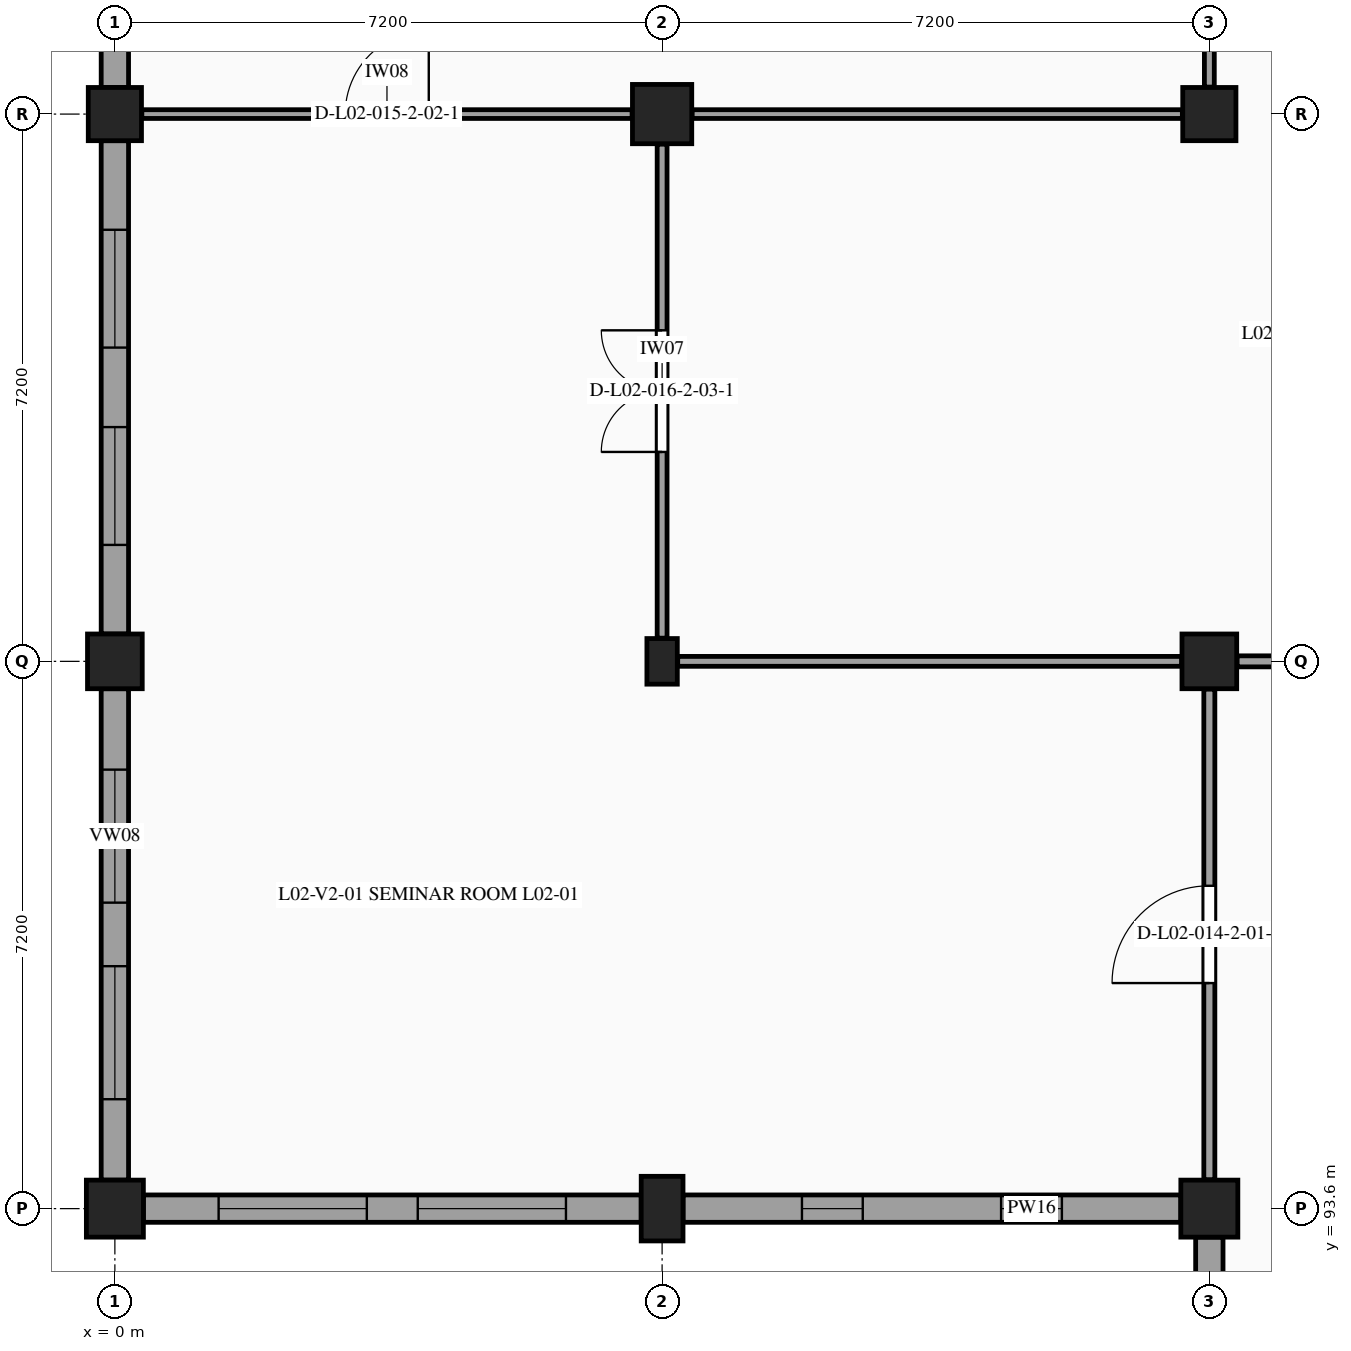
"""IFC4 building model, lengths in metres.
Left out: names, types, materials, properties, quantities, classifications, styles, units other than length and angle.
Written with IfcOpenShell. Run it as: python <this file> out.ifc"""

import sys

from ifc_helpers import new_model, si_unit, direction, frame, frame_2d, origin, origin_2d, place, context, subcontext, project, spatial, rectangle, extrude, element, fill, save


model = new_model("IFC4")
c1 = context("Model", 3, precision=1e-05, world=origin(), true_north=direction((0.0, 1.0)))
c2 = subcontext(c1, "Body", "Model", "MODEL_VIEW")
j1 = project(units=[si_unit("LENGTHUNIT", "METRE"), si_unit("PLANEANGLEUNIT", "RADIAN")], contexts=[c1])
p1 = place(None, origin())
s1 = spatial("IfcSite", under=j1, at=p1, CompositionType="ELEMENT")
p2 = place(p1, origin())
s2 = spatial("IfcBuilding", under=s1, at=p2, CompositionType="ELEMENT")
p3 = place(p2, frame((0.0, 0.0, 9.9)))
s3 = spatial("IfcBuildingStorey", under=s2, at=p3, CompositionType="ELEMENT", Elevation=9.9)
p4 = place(p3, frame((0.0, 93.6, 0.0), z_axis=(0.0, 0.0, 1.0), x_axis=(1.0, 0.0, 0.0)))
e1 = element("IfcColumn", 1, at=p4, inside=s3, PredefinedType="COLUMN", context=c2, shape_type="SweptSolid", body=[
    extrude(rectangle(XDim=0.75, YDim=0.75, at=origin_2d()), origin(), (0.0, 0.0, 1.0), 4.5),
])
p5 = place(p3, frame((0.0, 100.8, 0.0), z_axis=(0.0, 0.0, 1.0), x_axis=(1.0, 0.0, 0.0)))
e2 = element("IfcColumn", 2, at=p5, inside=s3, PredefinedType="COLUMN", context=c2, shape_type="SweptSolid", body=[
    extrude(rectangle(XDim=0.72, YDim=0.72, at=origin_2d()), origin(), (0.0, 0.0, 1.0), 4.5),
])
p6 = place(p3, frame((0.0, 108.0, 0.0), z_axis=(0.0, 0.0, 1.0), x_axis=(1.0, 0.0, 0.0)))
e3 = element("IfcColumn", 3, at=p6, inside=s3, PredefinedType="COLUMN", context=c2, shape_type="SweptSolid", body=[
    extrude(rectangle(XDim=0.7, YDim=0.7, at=origin_2d()), origin(), (0.0, 0.0, 1.0), 4.5),
])
p7 = place(p3, frame((7.2, 93.6, 0.0), z_axis=(0.0, 0.0, 1.0), x_axis=(1.0, 0.0, 0.0)))
e4 = element("IfcColumn", 4, at=p7, inside=s3, PredefinedType="COLUMN", context=c2, shape_type="SweptSolid", body=[
    extrude(rectangle(XDim=0.55, YDim=0.85, at=origin_2d()), origin(), (0.0, 0.0, 1.0), 4.5),
])
p8 = place(p3, frame((7.2, 100.8, 0.0), z_axis=(0.0, 0.0, 1.0), x_axis=(1.0, 0.0, 0.0)))
e5 = element("IfcColumn", 5, at=p8, inside=s3, PredefinedType="PILASTER", context=c2, shape_type="SweptSolid", body=[
    extrude(rectangle(XDim=0.4, YDim=0.6, at=origin_2d()), origin(), (0.0, 0.0, 1.0), 4.5),
])
p9 = place(p3, frame((7.2, 108.0, 0.0), z_axis=(0.0, 0.0, 1.0), x_axis=(1.0, 0.0, 0.0)))
e6 = element("IfcColumn", 6, at=p9, inside=s3, PredefinedType="COLUMN", context=c2, shape_type="SweptSolid", body=[
    extrude(rectangle(XDim=0.78, YDim=0.78, at=origin_2d()), origin(), (0.0, 0.0, 1.0), 4.5),
])
p10 = place(p3, frame((14.4, 93.6, 0.0), z_axis=(0.0, 0.0, 1.0), x_axis=(1.0, 0.0, 0.0)))
e7 = element("IfcColumn", 7, at=p10, inside=s3, PredefinedType="COLUMN", context=c2, shape_type="SweptSolid", body=[
    extrude(rectangle(XDim=0.75, YDim=0.75, at=origin_2d()), origin(), (0.0, 0.0, 1.0), 4.5),
])
p11 = place(p3, frame((14.4, 100.8, 0.0), z_axis=(0.0, 0.0, 1.0), x_axis=(1.0, 0.0, 0.0)))
e8 = element("IfcColumn", 8, at=p11, inside=s3, PredefinedType="COLUMN", context=c2, shape_type="SweptSolid", body=[
    extrude(rectangle(XDim=0.72, YDim=0.72, at=origin_2d()), origin(), (0.0, 0.0, 1.0), 4.5),
])
p12 = place(p3, frame((14.4, 108.0, 0.0), z_axis=(0.0, 0.0, 1.0), x_axis=(1.0, 0.0, 0.0)))
e9 = element("IfcColumn", 9, at=p12, inside=s3, PredefinedType="COLUMN", context=c2, shape_type="SweptSolid", body=[
    extrude(rectangle(XDim=0.7, YDim=0.7, at=origin_2d()), origin(), (0.0, 0.0, 1.0), 4.5),
])
p13 = place(p3, frame((14.4, 86.79, 0.0), z_axis=(0.0, 0.0, 1.0), x_axis=(0.0, 1.0, 0.0)))
e10 = element("IfcWall", 10, at=p13, inside=s3, PredefinedType="STANDARD", context=c2, shape_type="SweptSolid", body=[
    extrude(rectangle(XDim=6.435, YDim=0.36, at=frame_2d((3.218, 0.0))), origin(), (0.0, 0.0, 1.0), 3.47),
])
p14 = place(p13, frame((1.256, 0.0, 1.15)))
e11 = element("IfcOpeningElement", 11, at=p14, cuts=e10, PredefinedType="OPENING", context=c2, shape_type="SweptSolid", body=[
    extrude(rectangle(XDim=1.35, YDim=1.1, at=frame_2d((0.675, 0.55))), frame((0.0, 0.19, 0.0), z_axis=(0.0, -1.0, 0.0), x_axis=(1.0, 0.0, 0.0)), (0.0, 0.0, 1.0), 0.38),
])
p15 = place(p13, frame((3.83, 0.0, 1.15)))
e12 = element("IfcOpeningElement", 12, at=p15, cuts=e10, PredefinedType="OPENING", context=c2, shape_type="SweptSolid", body=[
    extrude(rectangle(XDim=1.35, YDim=1.1, at=frame_2d((0.675, 0.55))), frame((0.0, 0.19, 0.0), z_axis=(0.0, -1.0, 0.0), x_axis=(1.0, 0.0, 0.0)), (0.0, 0.0, 1.0), 0.38),
])
p16 = place(p3, frame((14.025, 93.6, 0.0), z_axis=(0.0, 0.0, 1.0), x_axis=(-1.0, 0.0, 0.0)))
e13 = element("IfcWall", 13, at=p16, inside=s3, PredefinedType="STANDARD", context=c2, shape_type="SweptSolid", body=[
    extrude(rectangle(XDim=6.55, YDim=0.36, at=frame_2d((3.275, 0.0))), origin(), (0.0, 0.0, 1.0), 3.47),
])
p17 = place(p16, frame((1.565, 0.0, 1.15)))
e14 = element("IfcOpeningElement", 14, at=p17, cuts=e13, PredefinedType="OPENING", context=c2, shape_type="SweptSolid", body=[
    extrude(rectangle(XDim=0.8, YDim=1.5, at=frame_2d((0.4, 0.75))), frame((0.0, 0.19, 0.0), z_axis=(0.0, -1.0, 0.0), x_axis=(1.0, 0.0, 0.0)), (0.0, 0.0, 1.0), 0.38),
])
p18 = place(p16, frame((4.185, 0.0, 1.15)))
e15 = element("IfcOpeningElement", 15, at=p18, cuts=e13, PredefinedType="OPENING", context=c2, shape_type="SweptSolid", body=[
    extrude(rectangle(XDim=0.8, YDim=1.5, at=frame_2d((0.4, 0.75))), frame((0.0, 0.19, 0.0), z_axis=(0.0, -1.0, 0.0), x_axis=(1.0, 0.0, 0.0)), (0.0, 0.0, 1.0), 0.38),
])
p19 = place(p3, frame((6.925, 93.6, 0.0), z_axis=(0.0, 0.0, 1.0), x_axis=(-1.0, 0.0, 0.0)))
e16 = element("IfcWall", 16, at=p19, inside=s3, PredefinedType="STANDARD", context=c2, shape_type="SweptSolid", body=[
    extrude(rectangle(XDim=6.55, YDim=0.36, at=frame_2d((3.275, 0.0))), origin(), (0.0, 0.0, 1.0), 3.47),
])
p20 = place(p19, frame((0.99, 0.0, 1.15)))
e17 = element("IfcOpeningElement", 17, at=p20, cuts=e16, PredefinedType="OPENING", context=c2, shape_type="SweptSolid", body=[
    extrude(rectangle(XDim=1.95, YDim=1.4, at=frame_2d((0.975, 0.7))), frame((0.0, 0.19, 0.0), z_axis=(0.0, -1.0, 0.0), x_axis=(1.0, 0.0, 0.0)), (0.0, 0.0, 1.0), 0.38),
])
p21 = place(p19, frame((3.61, 0.0, 1.15)))
e18 = element("IfcOpeningElement", 18, at=p21, cuts=e16, PredefinedType="OPENING", context=c2, shape_type="SweptSolid", body=[
    extrude(rectangle(XDim=1.95, YDim=1.4, at=frame_2d((0.975, 0.7))), frame((0.0, 0.19, 0.0), z_axis=(0.0, -1.0, 0.0), x_axis=(1.0, 0.0, 0.0)), (0.0, 0.0, 1.0), 0.38),
])
p22 = place(p3, frame((0.0, 93.975, 0.0), z_axis=(0.0, 0.0, 1.0), x_axis=(0.0, 1.0, 0.0)))
e19 = element("IfcWall", 19, at=p22, inside=s3, PredefinedType="STANDARD", context=c2, shape_type="SweptSolid", body=[
    extrude(rectangle(XDim=6.465, YDim=0.36, at=frame_2d((3.232, 0.0))), origin(), (0.0, 0.0, 1.0), 3.47),
])
p23 = place(p22, frame((1.064, 0.0, 1.15)))
e20 = element("IfcOpeningElement", 20, at=p23, cuts=e19, PredefinedType="OPENING", context=c2, shape_type="SweptSolid", body=[
    extrude(rectangle(XDim=1.75, YDim=1.4, at=frame_2d((0.875, 0.7))), frame((0.0, 0.19, 0.0), z_axis=(0.0, -1.0, 0.0), x_axis=(1.0, 0.0, 0.0)), (0.0, 0.0, 1.0), 0.38),
])
p24 = place(p22, frame((3.65, 0.0, 1.15)))
e21 = element("IfcOpeningElement", 21, at=p24, cuts=e19, PredefinedType="OPENING", context=c2, shape_type="SweptSolid", body=[
    extrude(rectangle(XDim=1.75, YDim=1.4, at=frame_2d((0.875, 0.7))), frame((0.0, 0.19, 0.0), z_axis=(0.0, -1.0, 0.0), x_axis=(1.0, 0.0, 0.0)), (0.0, 0.0, 1.0), 0.38),
])
p25 = place(p3, frame((0.0, 101.16, 0.0), z_axis=(0.0, 0.0, 1.0), x_axis=(0.0, 1.0, 0.0)))
e22 = element("IfcWall", 22, at=p25, inside=s3, PredefinedType="STANDARD", context=c2, shape_type="SweptSolid", body=[
    extrude(rectangle(XDim=6.49, YDim=0.36, at=frame_2d((3.245, 0.0))), origin(), (0.0, 0.0, 1.0), 3.47),
])
p26 = place(p25, frame((1.172, 0.0, 1.15)))
e23 = element("IfcOpeningElement", 23, at=p26, cuts=e22, PredefinedType="OPENING", context=c2, shape_type="SweptSolid", body=[
    extrude(rectangle(XDim=1.55, YDim=1.35, at=frame_2d((0.775, 0.675))), frame((0.0, 0.19, 0.0), z_axis=(0.0, -1.0, 0.0), x_axis=(1.0, 0.0, 0.0)), (0.0, 0.0, 1.0), 0.38),
])
p27 = place(p25, frame((3.768, 0.0, 1.15)))
e24 = element("IfcOpeningElement", 24, at=p27, cuts=e22, PredefinedType="OPENING", context=c2, shape_type="SweptSolid", body=[
    extrude(rectangle(XDim=1.55, YDim=1.35, at=frame_2d((0.775, 0.675))), frame((0.0, 0.19, 0.0), z_axis=(0.0, -1.0, 0.0), x_axis=(1.0, 0.0, 0.0)), (0.0, 0.0, 1.0), 0.38),
])
p28 = place(p3, frame((0.0, 108.35, 0.0), z_axis=(0.0, 0.0, 1.0), x_axis=(0.0, 1.0, 0.0)))
e25 = element("IfcWall", 25, at=p28, inside=s3, PredefinedType="STANDARD", context=c2, shape_type="SweptSolid", body=[
    extrude(rectangle(XDim=6.425, YDim=0.36, at=frame_2d((3.212, 0.0))), origin(), (0.0, 0.0, 1.0), 3.47),
])
p29 = place(p28, frame((1.228, 0.0, 1.15)))
e26 = element("IfcOpeningElement", 26, at=p29, cuts=e25, PredefinedType="OPENING", context=c2, shape_type="SweptSolid", body=[
    extrude(rectangle(XDim=1.4, YDim=1.3, at=frame_2d((0.7, 0.65))), frame((0.0, 0.19, 0.0), z_axis=(0.0, -1.0, 0.0), x_axis=(1.0, 0.0, 0.0)), (0.0, 0.0, 1.0), 0.38),
])
p30 = place(p28, frame((3.798, 0.0, 1.15)))
e27 = element("IfcOpeningElement", 27, at=p30, cuts=e25, PredefinedType="OPENING", context=c2, shape_type="SweptSolid", body=[
    extrude(rectangle(XDim=1.4, YDim=1.3, at=frame_2d((0.7, 0.65))), frame((0.0, 0.19, 0.0), z_axis=(0.0, -1.0, 0.0), x_axis=(1.0, 0.0, 0.0)), (0.0, 0.0, 1.0), 0.38),
])
p31 = place(p3, frame((7.2, 101.105, 0.0), z_axis=(0.0, 0.0, 1.0), x_axis=(0.0, 1.0, 0.0)))
e28 = element("IfcWall", 28, at=p31, inside=s3, PredefinedType="PARTITIONING", context=c2, shape_type="SweptSolid", body=[
    extrude(rectangle(XDim=6.5, YDim=0.13, at=frame_2d((3.25, 0.0))), origin(), (0.0, 0.0, 1.0), 3.54),
])
p32 = place(p31, frame((2.45, 0.0, 0.0)))
e29 = element("IfcOpeningElement", 29, at=p32, cuts=e28, PredefinedType="OPENING", context=c2, shape_type="SweptSolid", body=[
    extrude(rectangle(XDim=1.6, YDim=2.2, at=frame_2d((0.8, 1.1))), frame((0.0, 0.075, 0.0), z_axis=(0.0, -1.0, 0.0), x_axis=(1.0, 0.0, 0.0)), (0.0, 0.0, 1.0), 0.15),
])
p33 = place(p3, frame((0.355, 108.0, 0.0), z_axis=(0.0, 0.0, 1.0), x_axis=(1.0, 0.0, 0.0)))
e30 = element("IfcWall", 30, at=p33, inside=s3, PredefinedType="PARTITIONING", context=c2, shape_type="SweptSolid", body=[
    extrude(rectangle(XDim=6.45, YDim=0.115, at=frame_2d((3.225, 0.0))), origin(), (0.0, 0.0, 1.0), 3.485),
])
p34 = place(p33, frame((2.675, 0.0, 0.0)))
e31 = element("IfcOpeningElement", 31, at=p34, cuts=e30, PredefinedType="OPENING", context=c2, shape_type="SweptSolid", body=[
    extrude(rectangle(XDim=1.1, YDim=2.15, at=frame_2d((0.55, 1.075))), frame((0.0, 0.067, 0.0), z_axis=(0.0, -1.0, 0.0), x_axis=(1.0, 0.0, 0.0)), (0.0, 0.0, 1.0), 0.135),
])
p35 = place(p3, frame((14.4, 93.98, 0.0), z_axis=(0.0, 0.0, 1.0), x_axis=(0.0, 1.0, 0.0)))
e32 = element("IfcWall", 32, at=p35, inside=s3, PredefinedType="PARTITIONING", context=c2, shape_type="SweptSolid", body=[
    extrude(rectangle(XDim=6.455, YDim=0.145, at=frame_2d((3.228, 0.0))), origin(), (0.0, 0.0, 1.0), 3.54),
])
p36 = place(p35, frame((2.587, 0.0, 0.0)))
e33 = element("IfcOpeningElement", 33, at=p36, cuts=e32, PredefinedType="OPENING", context=c2, shape_type="SweptSolid", body=[
    extrude(rectangle(XDim=1.28, YDim=2.24, at=frame_2d((0.64, 1.12))), frame((0.0, 0.083, 0.0), z_axis=(0.0, -1.0, 0.0), x_axis=(1.0, 0.0, 0.0)), (0.0, 0.0, 1.0), 0.165),
])
p37 = place(p3, frame((7.405, 100.8, 0.0), z_axis=(0.0, 0.0, 1.0), x_axis=(1.0, 0.0, 0.0)))
e34 = element("IfcWall", 34, at=p37, inside=s3, PredefinedType="PARTITIONING", context=c2, shape_type="SweptSolid", body=[
    extrude(rectangle(XDim=6.63, YDim=0.13, at=frame_2d((3.315, 0.0))), origin(), (0.0, 0.0, 1.0), 3.5),
])
p38 = place(p3, frame((7.595, 108.0, 0.0), z_axis=(0.0, 0.0, 1.0), x_axis=(1.0, 0.0, 0.0)))
e35 = element("IfcWall", 35, at=p38, inside=s3, PredefinedType="PARTITIONING", context=c2, shape_type="SweptSolid", body=[
    extrude(rectangle(XDim=6.45, YDim=0.115, at=frame_2d((3.225, 0.0))), origin(), (0.0, 0.0, 1.0), 3.5),
])
p39 = place(p3, frame((14.4, 108.355, 0.0), z_axis=(0.0, 0.0, 1.0), x_axis=(0.0, 1.0, 0.0)))
e36 = element("IfcWall", 36, at=p39, inside=s3, PredefinedType="PARTITIONING", context=c2, shape_type="SweptSolid", body=[
    extrude(rectangle(XDim=6.415, YDim=0.13, at=frame_2d((3.208, 0.0))), origin(), (0.0, 0.0, 1.0), 3.535),
])
p40 = place(p3, frame((14.765, 100.8, 0.0), z_axis=(0.0, 0.0, 1.0), x_axis=(1.0, 0.0, 0.0)))
e37 = element("IfcWall", 37, at=p40, inside=s3, PredefinedType="PARTITIONING", context=c2, shape_type="SweptSolid", body=[
    extrude(rectangle(XDim=6.63, YDim=0.145, at=frame_2d((3.315, 0.0))), origin(), (0.0, 0.0, 1.0), 3.505),
])
p41 = place(p17, origin())
e38 = element("IfcWindow", 38, at=p41, inside=s3, PartitioningType="SINGLE_PANEL", PredefinedType="WINDOW", context=c2, shape_type="SweptSolid", body=[
    extrude(rectangle(XDim=0.8, YDim=1.5, at=frame_2d((0.4, 0.75))), frame((0.0, -0.08, 0.0), z_axis=(0.0, -1.0, 0.0), x_axis=(1.0, 0.0, 0.0)), (0.0, 0.0, 1.0), 0.06),
])
fill(e14, e38)
p42 = place(p18, origin())
e39 = element("IfcWindow", 39, at=p42, inside=s3, PartitioningType="SINGLE_PANEL", PredefinedType="WINDOW", context=c2, shape_type="SweptSolid", body=[
    extrude(rectangle(XDim=0.8, YDim=1.5, at=frame_2d((0.4, 0.75))), frame((0.0, -0.08, 0.0), z_axis=(0.0, -1.0, 0.0), x_axis=(1.0, 0.0, 0.0)), (0.0, 0.0, 1.0), 0.06),
])
fill(e15, e39)
p43 = place(p20, origin())
e40 = element("IfcWindow", 40, at=p43, inside=s3, PartitioningType="SINGLE_PANEL", PredefinedType="WINDOW", context=c2, shape_type="SweptSolid", body=[
    extrude(rectangle(XDim=1.95, YDim=1.4, at=frame_2d((0.975, 0.7))), frame((0.0, -0.08, 0.0), z_axis=(0.0, -1.0, 0.0), x_axis=(1.0, 0.0, 0.0)), (0.0, 0.0, 1.0), 0.06),
])
fill(e17, e40)
p44 = place(p21, origin())
e41 = element("IfcWindow", 41, at=p44, inside=s3, PartitioningType="SINGLE_PANEL", PredefinedType="WINDOW", context=c2, shape_type="SweptSolid", body=[
    extrude(rectangle(XDim=1.95, YDim=1.4, at=frame_2d((0.975, 0.7))), frame((0.0, -0.08, 0.0), z_axis=(0.0, -1.0, 0.0), x_axis=(1.0, 0.0, 0.0)), (0.0, 0.0, 1.0), 0.06),
])
fill(e18, e41)
p45 = place(p23, origin())
e42 = element("IfcWindow", 42, at=p45, inside=s3, PartitioningType="SINGLE_PANEL", PredefinedType="WINDOW", context=c2, shape_type="SweptSolid", body=[
    extrude(rectangle(XDim=1.75, YDim=1.4, at=frame_2d((0.875, 0.7))), frame((0.0, -0.08, 0.0), z_axis=(0.0, -1.0, 0.0), x_axis=(1.0, 0.0, 0.0)), (0.0, 0.0, 1.0), 0.06),
])
fill(e20, e42)
p46 = place(p24, origin())
e43 = element("IfcWindow", 43, at=p46, inside=s3, PartitioningType="SINGLE_PANEL", PredefinedType="WINDOW", context=c2, shape_type="SweptSolid", body=[
    extrude(rectangle(XDim=1.75, YDim=1.4, at=frame_2d((0.875, 0.7))), frame((0.0, -0.08, 0.0), z_axis=(0.0, -1.0, 0.0), x_axis=(1.0, 0.0, 0.0)), (0.0, 0.0, 1.0), 0.06),
])
fill(e21, e43)
p47 = place(p26, origin())
e44 = element("IfcWindow", 44, at=p47, inside=s3, PartitioningType="SINGLE_PANEL", PredefinedType="WINDOW", context=c2, shape_type="SweptSolid", body=[
    extrude(rectangle(XDim=1.55, YDim=1.35, at=frame_2d((0.775, 0.675))), frame((0.0, -0.08, 0.0), z_axis=(0.0, -1.0, 0.0), x_axis=(1.0, 0.0, 0.0)), (0.0, 0.0, 1.0), 0.06),
])
fill(e23, e44)
p48 = place(p27, origin())
e45 = element("IfcWindow", 45, at=p48, inside=s3, PartitioningType="SINGLE_PANEL", PredefinedType="WINDOW", context=c2, shape_type="SweptSolid", body=[
    extrude(rectangle(XDim=1.55, YDim=1.35, at=frame_2d((0.775, 0.675))), frame((0.0, -0.08, 0.0), z_axis=(0.0, -1.0, 0.0), x_axis=(1.0, 0.0, 0.0)), (0.0, 0.0, 1.0), 0.06),
])
fill(e24, e45)
p49 = place(p36, origin())
e46 = element("IfcDoor", 46, at=p49, inside=s3, OperationType="SINGLE_SWING_LEFT", PredefinedType="DOOR", context=c2, shape_type="SweptSolid", body=[
    extrude(rectangle(XDim=1.28, YDim=2.24, at=frame_2d((0.64, 1.12))), frame((0.0, 0.025, 0.0), z_axis=(0.0, -1.0, 0.0), x_axis=(1.0, 0.0, 0.0)), (0.0, 0.0, 1.0), 0.05),
])
fill(e33, e46)
p50 = place(p34, origin())
e47 = element("IfcDoor", 47, at=p50, inside=s3, OperationType="SINGLE_SWING_RIGHT", PredefinedType="DOOR", context=c2, shape_type="SweptSolid", body=[
    extrude(rectangle(XDim=1.1, YDim=2.15, at=frame_2d((0.55, 1.075))), frame((0.0, 0.025, 0.0), z_axis=(0.0, -1.0, 0.0), x_axis=(1.0, 0.0, 0.0)), (0.0, 0.0, 1.0), 0.05),
])
fill(e31, e47)
p51 = place(p32, origin())
e48 = element("IfcDoor", 48, at=p51, inside=s3, OperationType="DOUBLE_DOOR_SINGLE_SWING", PredefinedType="DOOR", context=c2, shape_type="SweptSolid", body=[
    extrude(rectangle(XDim=1.6, YDim=2.2, at=frame_2d((0.8, 1.1))), frame((0.0, 0.025, 0.0), z_axis=(0.0, -1.0, 0.0), x_axis=(1.0, 0.0, 0.0)), (0.0, 0.0, 1.0), 0.05),
])
fill(e29, e48)
save(model, sys.argv[1])
